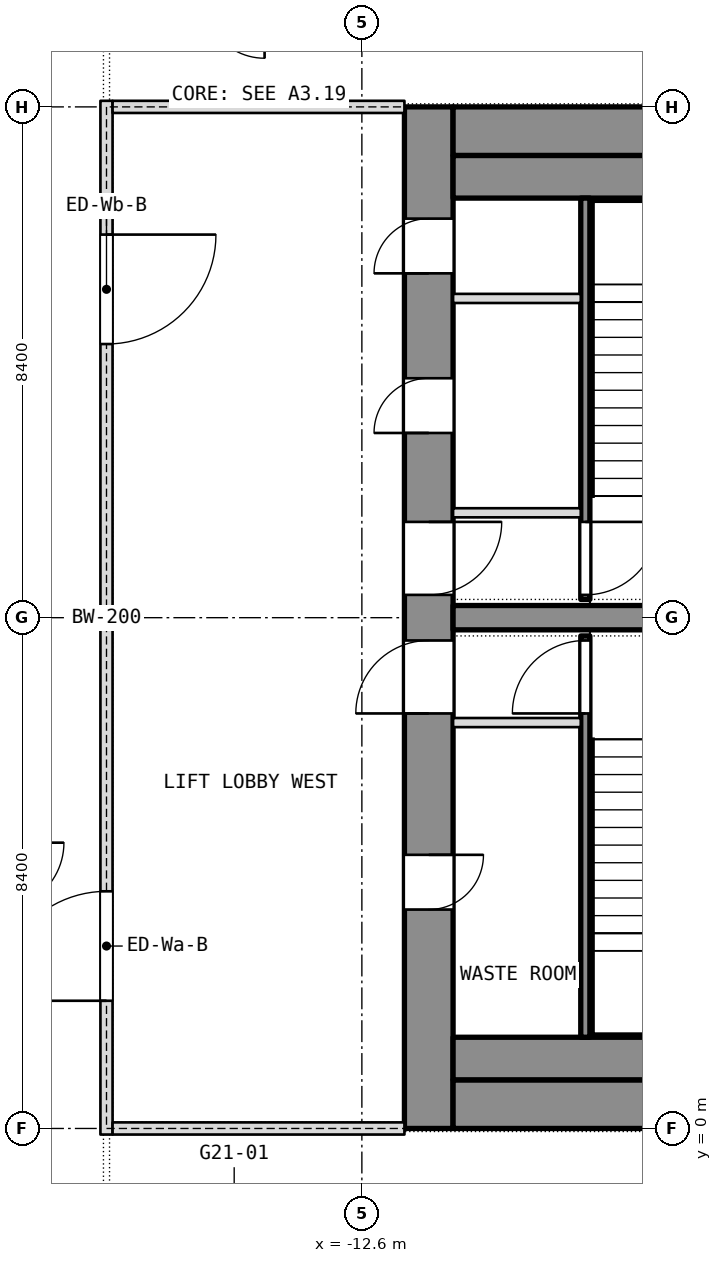
"""IFC4 building model, lengths in metres.
Left out: names, types, materials, properties, quantities, classifications, styles, units other than length and angle.
Written with IfcOpenShell. Run it as: python <this file> out.ifc"""

import sys

from ifc_helpers import new_model, si_unit, direction, frame, frame_2d, origin, place, context, subcontext, project, spatial, rectangle, extrude, element, fill, save


model = new_model("IFC4")
c1 = context("Model", 3, precision=1e-05, world=origin(), true_north=direction((0.0, 1.0)))
c2 = subcontext(c1, "Body", "Model", "MODEL_VIEW")
j1 = project(units=[si_unit("LENGTHUNIT", "METRE"), si_unit("PLANEANGLEUNIT", "RADIAN")], contexts=[c1])
p1 = place(None, origin())
s1 = spatial("IfcSite", under=j1, at=p1, CompositionType="ELEMENT")
p2 = place(p1, origin())
s2 = spatial("IfcBuilding", under=s1, at=p2, CompositionType="ELEMENT")
p3 = place(p2, frame((0.0, 0.0, 248.9)))
s3 = spatial("IfcBuildingStorey", under=s2, at=p3, CompositionType="ELEMENT", Elevation=248.9)
p4 = place(p3, frame((-11.5, 0.0, 0.0), z_axis=(0.0, 0.0, 1.0), x_axis=(0.0, 1.0, 0.0)))
e1 = element("IfcWall", 1, at=p4, inside=s3, PredefinedType="SHEAR", context=c2, shape_type="SweptSolid", body=[
    extrude(rectangle(XDim=16.8, YDim=0.8, at=frame_2d((8.4, 0.0))), origin(), (0.0, 0.0, 1.0), 3.6),
])
p5 = place(p4, frame((3.6, 0.0, 0.0)))
e2 = element("IfcOpeningElement", 2, at=p5, cuts=e1, PredefinedType="OPENING", context=c2, shape_type="SweptSolid", body=[
    extrude(rectangle(XDim=0.9, YDim=2.1, at=frame_2d((0.45, 1.05))), frame((0.0, 0.4, 0.0), z_axis=(0.0, -1.0, 0.0), x_axis=(1.0, 0.0, 0.0)), (0.0, 0.0, 1.0), 0.8),
])
p6 = place(p4, frame((6.825, 0.0, 0.0)))
e3 = element("IfcOpeningElement", 3, at=p6, cuts=e1, PredefinedType="OPENING", context=c2, shape_type="SweptSolid", body=[
    extrude(rectangle(XDim=1.2, YDim=2.1, at=frame_2d((0.6, 1.05))), frame((0.0, 0.4, 0.0), z_axis=(0.0, -1.0, 0.0), x_axis=(1.0, 0.0, 0.0)), (0.0, 0.0, 1.0), 0.8),
])
p7 = place(p4, frame((14.062, 0.0, 0.0)))
e4 = element("IfcOpeningElement", 4, at=p7, cuts=e1, PredefinedType="OPENING", context=c2, shape_type="SweptSolid", body=[
    extrude(rectangle(XDim=0.9, YDim=2.1, at=frame_2d((0.45, 1.05))), frame((0.0, 0.4, 0.0), z_axis=(0.0, -1.0, 0.0), x_axis=(1.0, 0.0, 0.0)), (0.0, 0.0, 1.0), 0.8),
])
p8 = place(p4, frame((11.438, 0.0, 0.0)))
e5 = element("IfcOpeningElement", 5, at=p8, cuts=e1, PredefinedType="OPENING", context=c2, shape_type="SweptSolid", body=[
    extrude(rectangle(XDim=0.9, YDim=2.1, at=frame_2d((0.45, 1.05))), frame((0.0, 0.4, 0.0), z_axis=(0.0, -1.0, 0.0), x_axis=(1.0, 0.0, 0.0)), (0.0, 0.0, 1.0), 0.8),
])
p9 = place(p4, frame((8.775, 0.0, 0.0)))
e6 = element("IfcOpeningElement", 6, at=p9, cuts=e1, PredefinedType="OPENING", context=c2, shape_type="SweptSolid", body=[
    extrude(rectangle(XDim=1.2, YDim=2.1, at=frame_2d((0.6, 1.05))), frame((0.0, 0.4, 0.0), z_axis=(0.0, -1.0, 0.0), x_axis=(1.0, 0.0, 0.0)), (0.0, 0.0, 1.0), 0.8),
])
for number, where, z_axis, x_axis in (
    (7, (-11.1, 0.4, 0.0), (0.0, 0.0, 1.0), (1.0, 0.0, 0.0)),
    (8, (-11.1, 16.4, 0.0), (0.0, 0.0, 1.0), (1.0, 0.0, 0.0)),
):
    element("IfcWall", number, at=place(p3, frame(where, z_axis=z_axis, x_axis=x_axis)), inside=s3, PredefinedType="SHEAR", context=c2, shape_type="SweptSolid", body=[
        extrude(rectangle(XDim=22.2, YDim=0.8, at=frame_2d((11.1, 0.0))), origin(), (0.0, 0.0, 1.0), 3.6),
    ])
p10 = place(p3, frame((-11.1, 8.4, 0.0), z_axis=(0.0, 0.0, 1.0), x_axis=(1.0, 0.0, 0.0)))
e9 = element("IfcWall", 9, at=p10, inside=s3, PredefinedType="SHEAR", context=c2, shape_type="SweptSolid", body=[
    extrude(rectangle(XDim=6.7, YDim=0.4, at=frame_2d((3.35, 0.0))), origin(), (0.0, 0.0, 1.0), 3.6),
])
for number, where, z_axis, x_axis in (
    (10, (-11.1, 1.15, 0.0), (0.0, 0.0, 1.0), (1.0, 0.0, 0.0)),
    (11, (-11.1, 15.65, 0.0), (0.0, 0.0, 1.0), (1.0, 0.0, 0.0)),
):
    element("IfcWall", number, at=place(p3, frame(where, z_axis=z_axis, x_axis=x_axis)), inside=s3, PredefinedType="PARTITIONING", context=c2, shape_type="SweptSolid", body=[
        extrude(rectangle(XDim=22.2, YDim=0.7, at=frame_2d((11.1, 0.0))), origin(), (0.0, 0.0, 1.0), 3.3),
    ])
p11 = place(p3, frame((-8.925, 1.5, 0.0), z_axis=(0.0, 0.0, 1.0), x_axis=(0.0, 1.0, 0.0)))
e12 = element("IfcWall", 12, at=p11, inside=s3, PredefinedType="SHEAR", context=c2, shape_type="SweptSolid", body=[
    extrude(rectangle(XDim=6.6, YDim=0.15, at=frame_2d((3.3, 0.0))), origin(), (0.0, 0.0, 1.0), 3.3),
])
p12 = place(p11, frame((5.325, 0.0, 0.0)))
e13 = element("IfcOpeningElement", 13, at=p12, cuts=e12, PredefinedType="OPENING", context=c2, shape_type="SweptSolid", body=[
    extrude(rectangle(XDim=1.2, YDim=2.1, at=frame_2d((0.6, 1.05))), frame((0.0, 0.075, 0.0), z_axis=(0.0, -1.0, 0.0), x_axis=(1.0, 0.0, 0.0)), (0.0, 0.0, 1.0), 0.15),
])
p13 = place(p3, frame((-11.1, 6.675, 0.0), z_axis=(0.0, 0.0, 1.0), x_axis=(1.0, 0.0, 0.0)))
e14 = element("IfcWall", 14, at=p13, inside=s3, PredefinedType="PARTITIONING", context=c2, shape_type="SweptSolid", body=[
    extrude(rectangle(XDim=2.1, YDim=0.15, at=frame_2d((1.05, 0.0))), origin(), (0.0, 0.0, 1.0), 3.3),
])
p14 = place(p3, frame((-8.925, 8.7, 0.0), z_axis=(0.0, 0.0, 1.0), x_axis=(0.0, 1.0, 0.0)))
e15 = element("IfcWall", 15, at=p14, inside=s3, PredefinedType="SHEAR", context=c2, shape_type="SweptSolid", body=[
    extrude(rectangle(XDim=6.6, YDim=0.15, at=frame_2d((3.3, 0.0))), origin(), (0.0, 0.0, 1.0), 3.3),
])
p15 = place(p14, frame((0.075, 0.0, 0.0)))
e16 = element("IfcOpeningElement", 16, at=p15, cuts=e15, PredefinedType="OPENING", context=c2, shape_type="SweptSolid", body=[
    extrude(rectangle(XDim=1.2, YDim=2.1, at=frame_2d((0.6, 1.05))), frame((0.0, 0.075, 0.0), z_axis=(0.0, -1.0, 0.0), x_axis=(1.0, 0.0, 0.0)), (0.0, 0.0, 1.0), 0.15),
])
for number, where, z_axis, x_axis in (
    (17, (-11.1, 10.125, 0.0), (0.0, 0.0, 1.0), (1.0, 0.0, 0.0)),
    (18, (-11.1, 13.65, 0.0), (0.0, 0.0, 1.0), (1.0, 0.0, 0.0)),
):
    element("IfcWall", number, at=place(p3, frame(where, z_axis=z_axis, x_axis=x_axis)), inside=s3, PredefinedType="PARTITIONING", context=c2, shape_type="SweptSolid", body=[
        extrude(rectangle(XDim=2.1, YDim=0.15, at=frame_2d((1.05, 0.0))), origin(), (0.0, 0.0, 1.0), 3.3),
    ])
p16 = place(p3, frame((-16.8, -0.1, 0.0), z_axis=(0.0, 0.0, 1.0), x_axis=(0.0, 1.0, 0.0)))
e19 = element("IfcWall", 19, at=p16, inside=s3, PredefinedType="PARTITIONING", context=c2, shape_type="SweptSolid", body=[
    extrude(rectangle(XDim=17.0, YDim=0.2, at=frame_2d((8.5, 0.0))), origin(), (0.0, 0.0, 1.0), 3.3),
])
p17 = place(p16, frame((2.2, 0.0, 0.0)))
e20 = element("IfcOpeningElement", 20, at=p17, cuts=e19, PredefinedType="OPENING", context=c2, shape_type="SweptSolid", body=[
    extrude(rectangle(XDim=1.8, YDim=2.1, at=frame_2d((0.9, 1.05))), frame((0.0, 0.1, 0.0), z_axis=(0.0, -1.0, 0.0), x_axis=(1.0, 0.0, 0.0)), (0.0, 0.0, 1.0), 0.2),
])
p18 = place(p16, frame((13.0, 0.0, 0.0)))
e21 = element("IfcOpeningElement", 21, at=p18, cuts=e19, PredefinedType="OPENING", context=c2, shape_type="SweptSolid", body=[
    extrude(rectangle(XDim=1.8, YDim=2.1, at=frame_2d((0.9, 1.05))), frame((0.0, 0.1, 0.0), z_axis=(0.0, -1.0, 0.0), x_axis=(1.0, 0.0, 0.0)), (0.0, 0.0, 1.0), 0.2),
])
for number, where, z_axis, x_axis in (
    (22, (-16.7, 0.0, 0.0), (0.0, 0.0, 1.0), (1.0, 0.0, 0.0)),
    (23, (-16.7, 16.8, 0.0), (0.0, 0.0, 1.0), (1.0, 0.0, 0.0)),
):
    element("IfcWall", number, at=place(p3, frame(where, z_axis=z_axis, x_axis=x_axis)), inside=s3, PredefinedType="PARTITIONING", context=c2, shape_type="SweptSolid", body=[
        extrude(rectangle(XDim=4.8, YDim=0.2, at=frame_2d((2.4, 0.0))), origin(), (0.0, 0.0, 1.0), 2.9),
    ])
p19 = place(p5, origin())
e24 = element("IfcDoor", 24, at=p19, inside=s3, OperationType="SINGLE_SWING_LEFT", PredefinedType="DOOR", context=c2, shape_type="SweptSolid", body=[
    extrude(rectangle(XDim=0.9, YDim=2.1, at=frame_2d((0.45, 1.05))), frame((0.0, 0.025, 0.0), z_axis=(0.0, -1.0, 0.0), x_axis=(1.0, 0.0, 0.0)), (0.0, 0.0, 1.0), 0.05),
])
fill(e2, e24)
p20 = place(p6, origin())
e25 = element("IfcDoor", 25, at=p20, inside=s3, OperationType="SINGLE_SWING_LEFT", PredefinedType="DOOR", context=c2, shape_type="SweptSolid", body=[
    extrude(rectangle(XDim=1.2, YDim=2.1, at=frame_2d((0.6, 1.05))), frame((0.0, 0.025, 0.0), z_axis=(0.0, -1.0, 0.0), x_axis=(1.0, 0.0, 0.0)), (0.0, 0.0, 1.0), 0.05),
])
fill(e3, e25)
p21 = place(p12, origin())
e26 = element("IfcDoor", 26, at=p21, inside=s3, OperationType="SINGLE_SWING_LEFT", PredefinedType="DOOR", context=c2, shape_type="SweptSolid", body=[
    extrude(rectangle(XDim=1.2, YDim=2.1, at=frame_2d((0.6, 1.05))), frame((0.0, 0.025, 0.0), z_axis=(0.0, -1.0, 0.0), x_axis=(1.0, 0.0, 0.0)), (0.0, 0.0, 1.0), 0.05),
])
fill(e13, e26)
p22 = place(p7, origin())
e27 = element("IfcDoor", 27, at=p22, inside=s3, OperationType="SINGLE_SWING_LEFT", PredefinedType="DOOR", context=c2, shape_type="SweptSolid", body=[
    extrude(rectangle(XDim=0.9, YDim=2.1, at=frame_2d((0.45, 1.05))), frame((0.0, 0.025, 0.0), z_axis=(0.0, -1.0, 0.0), x_axis=(1.0, 0.0, 0.0)), (0.0, 0.0, 1.0), 0.05),
])
fill(e4, e27)
p23 = place(p8, origin())
e28 = element("IfcDoor", 28, at=p23, inside=s3, OperationType="SINGLE_SWING_LEFT", PredefinedType="DOOR", context=c2, shape_type="SweptSolid", body=[
    extrude(rectangle(XDim=0.9, YDim=2.1, at=frame_2d((0.45, 1.05))), frame((0.0, 0.025, 0.0), z_axis=(0.0, -1.0, 0.0), x_axis=(1.0, 0.0, 0.0)), (0.0, 0.0, 1.0), 0.05),
])
fill(e5, e28)
p24 = place(p9, origin())
e29 = element("IfcDoor", 29, at=p24, inside=s3, OperationType="SINGLE_SWING_LEFT", PredefinedType="DOOR", context=c2, shape_type="SweptSolid", body=[
    extrude(rectangle(XDim=1.2, YDim=2.1, at=frame_2d((0.6, 1.05))), frame((0.0, 0.025, 0.0), z_axis=(0.0, -1.0, 0.0), x_axis=(1.0, 0.0, 0.0)), (0.0, 0.0, 1.0), 0.05),
])
fill(e6, e29)
p25 = place(p15, origin())
e30 = element("IfcDoor", 30, at=p25, inside=s3, OperationType="SINGLE_SWING_LEFT", PredefinedType="DOOR", context=c2, shape_type="SweptSolid", body=[
    extrude(rectangle(XDim=1.2, YDim=2.1, at=frame_2d((0.6, 1.05))), frame((0.0, 0.025, 0.0), z_axis=(0.0, -1.0, 0.0), x_axis=(1.0, 0.0, 0.0)), (0.0, 0.0, 1.0), 0.05),
])
fill(e16, e30)
p26 = place(p17, origin())
e31 = element("IfcDoor", 31, at=p26, inside=s3, OperationType="DOUBLE_DOOR_SINGLE_SWING", PredefinedType="DOOR", context=c2, shape_type="SweptSolid", body=[
    extrude(rectangle(XDim=1.8, YDim=2.1, at=frame_2d((0.9, 1.05))), frame((0.0, 0.025, 0.0), z_axis=(0.0, -1.0, 0.0), x_axis=(1.0, 0.0, 0.0)), (0.0, 0.0, 1.0), 0.05),
])
fill(e20, e31)
p27 = place(p18, origin())
e32 = element("IfcDoor", 32, at=p27, inside=s3, OperationType="DOUBLE_DOOR_SINGLE_SWING", PredefinedType="DOOR", context=c2, shape_type="SweptSolid", body=[
    extrude(rectangle(XDim=1.8, YDim=2.1, at=frame_2d((0.9, 1.05))), frame((0.0, 0.025, 0.0), z_axis=(0.0, -1.0, 0.0), x_axis=(1.0, 0.0, 0.0)), (0.0, 0.0, 1.0), 0.05),
])
fill(e21, e32)
save(model, sys.argv[1])
